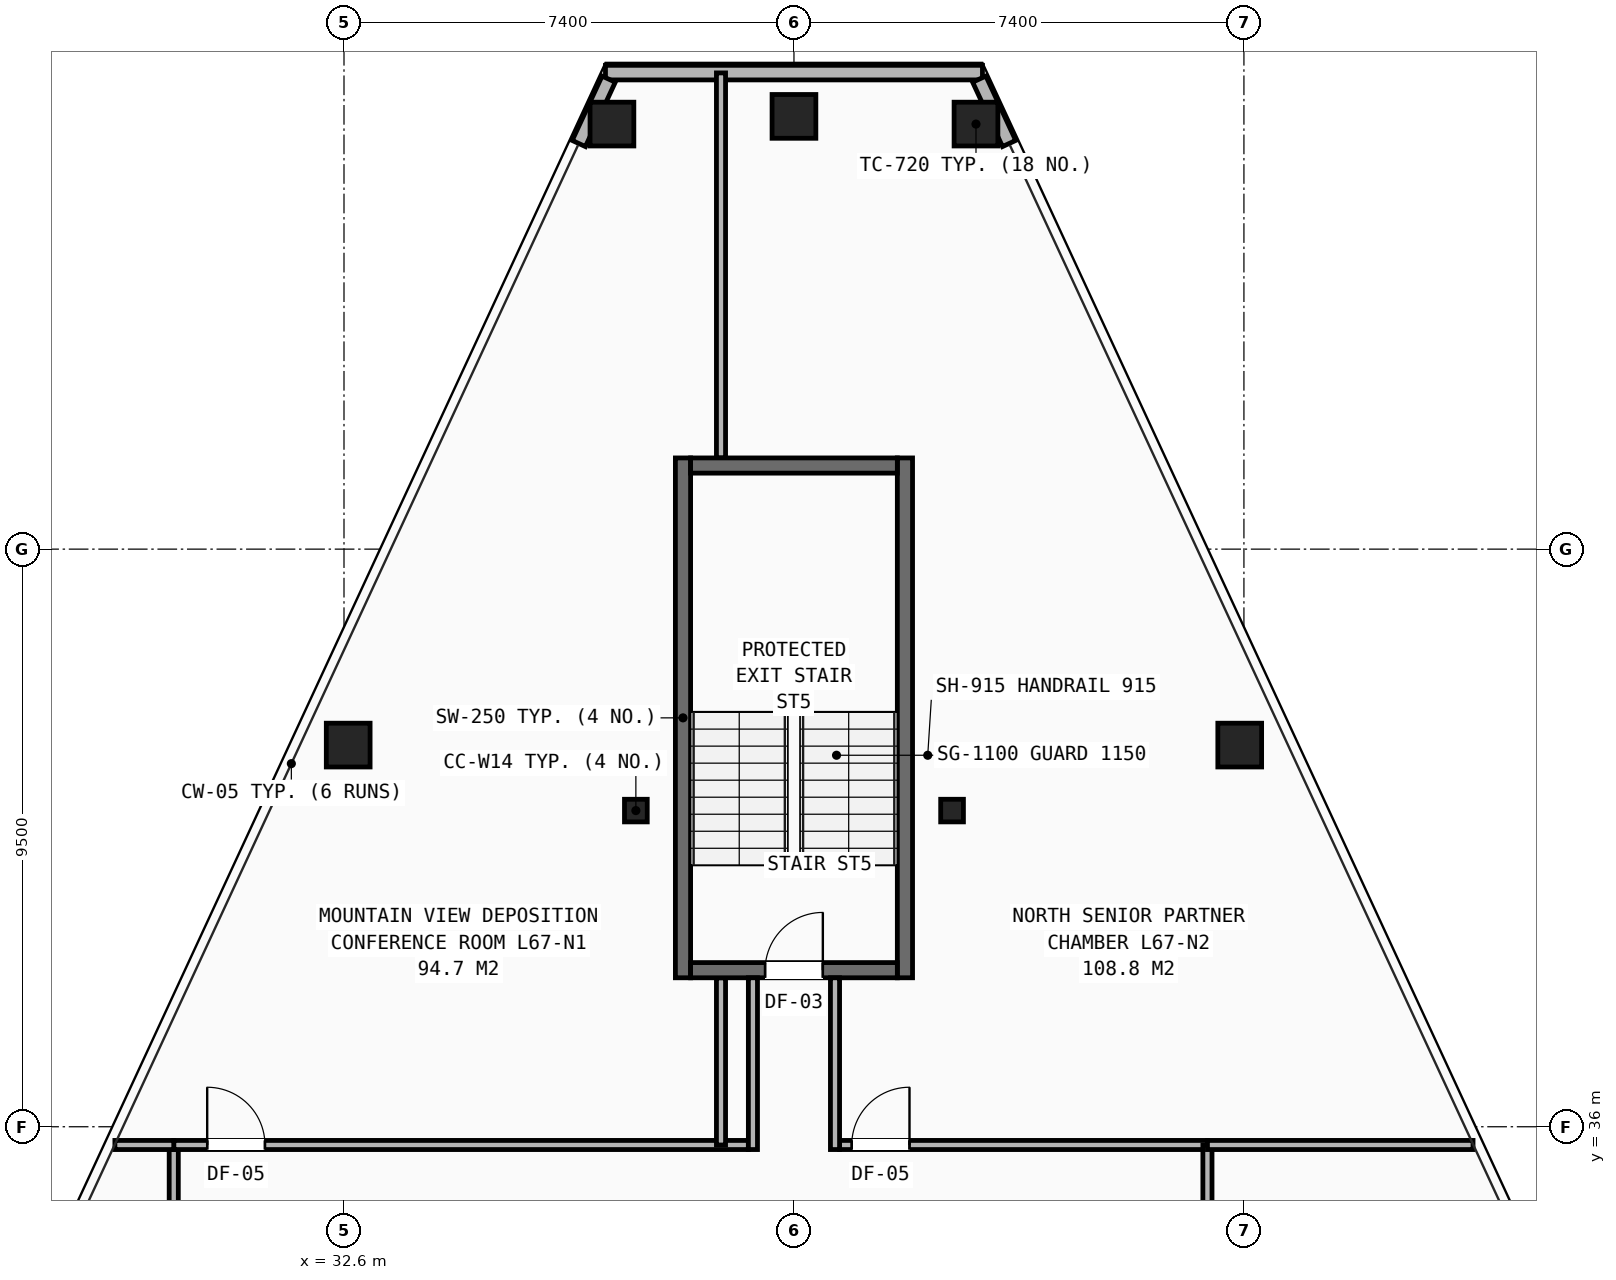
"""IFC4 building model, lengths in metres.
Left out: names, types, materials, properties, quantities, classifications, styles, units other than length and angle.
Written with IfcOpenShell. Run it as: python <this file> out.ifc"""

import sys

from ifc_helpers import new_model, si_unit, direction, frame, frame_2d, origin, origin_2d, place, context, subcontext, project, spatial, rectangle, hollow_rectangle, i_section, extrude, element, fill, save


model = new_model("IFC4")
c1 = context("Model", 3, precision=1e-05, world=origin(), true_north=direction((0.0, 1.0)))
c2 = subcontext(c1, "Body", "Model", "MODEL_VIEW")
j1 = project(units=[si_unit("LENGTHUNIT", "METRE"), si_unit("PLANEANGLEUNIT", "RADIAN")], contexts=[c1])
p1 = place(None, origin())
s1 = spatial("IfcSite", under=j1, at=p1, CompositionType="ELEMENT")
p2 = place(p1, origin())
s2 = spatial("IfcBuilding", under=s1, at=p2, CompositionType="ELEMENT")
p3 = place(p2, frame((0.0, 0.0, 236.4)))
s3 = spatial("IfcBuildingStorey", under=s2, at=p3, CompositionType="ELEMENT", Elevation=236.4)
for number, where, z_axis, x_axis in (
    (1, (37.4, 41.2, 0.0), (0.0, 0.0, 1.0), (1.0, 0.0, 0.0)),
    (2, (42.6, 41.2, 0.0), (0.0, 0.0, 1.0), (1.0, 0.0, 0.0)),
):
    element("IfcColumn", number, at=place(p3, frame(where, z_axis=z_axis, x_axis=x_axis)), inside=s3, PredefinedType="COLUMN", context=c2, shape_type="SweptSolid", body=[
        extrude(i_section(OverallWidth=0.374, OverallDepth=0.372, WebThickness=0.016, FlangeThickness=0.026, at=origin_2d()), origin(), (0.0, 0.0, 1.0), 3.5),
    ])
for number, where, z_axis, x_axis in (
    (3, (42.993, 52.491, 0.0), (0.0, 0.0, 1.0), (1.0, 0.0, 0.0)),
    (4, (40.0, 52.617, 0.0), (0.0, 0.0, 1.0), (1.0, 0.0, 0.0)),
    (5, (37.007, 52.491, 0.0), (0.0, 0.0, 1.0), (1.0, 0.0, 0.0)),
    (6, (32.669, 42.277, 0.0), (0.0, 0.0, 1.0), (1.0, 0.0, 0.0)),
    (7, (47.331, 42.277, 0.0), (0.0, 0.0, 1.0), (1.0, 0.0, 0.0)),
):
    element("IfcColumn", number, at=place(p3, frame(where, z_axis=z_axis, x_axis=x_axis)), inside=s3, PredefinedType="COLUMN", context=c2, shape_type="SweptSolid", body=[
        extrude(hollow_rectangle(XDim=0.72, YDim=0.72, WallThickness=0.05, at=origin_2d()), origin(), (0.0, 0.0, 1.0), 3.5),
    ])
p4 = place(p3, frame((36.9, 53.337, 0.0), z_axis=(0.0, 0.0, 1.0), x_axis=(1.0, 0.0, 0.0)))
e8 = element("IfcWall", 8, at=p4, inside=s3, PredefinedType="SHEAR", context=c2, shape_type="SweptSolid", body=[
    extrude(rectangle(XDim=6.2, YDim=0.24, at=frame_2d((3.1, 0.0))), origin(), (0.0, 0.0, 1.0), 2.623),
])
for number, where, z_axis, x_axis in (
    (9, (36.953, 53.23, 0.0), (0.0, 0.0, 1.0), (-0.421, -0.907, 0.0)),
    (10, (43.538, 52.171, 0.0), (0.0, 0.0, 1.0), (-0.421, 0.907, 0.0)),
):
    element("IfcWall", number, at=place(p3, frame(where, z_axis=z_axis, x_axis=x_axis)), inside=s3, PredefinedType="SHEAR", context=c2, shape_type="SweptSolid", body=[
        extrude(rectangle(XDim=1.167, YDim=0.24, at=frame_2d((0.584, 0.0))), origin(), (0.0, 0.0, 1.0), 2.623),
    ])
p5 = place(p3, frame((29.8, 16.4, 0.0), z_axis=(0.0, 0.0, 1.0), x_axis=(0.0, 1.0, 0.0)))
e11 = element("IfcWall", 11, at=p5, inside=s3, PredefinedType="PARTITIONING", context=c2, shape_type="SweptSolid", body=[
    extrude(rectangle(XDim=19.3, YDim=0.15, at=frame_2d((9.65, 0.0))), origin(), (0.0, 0.0, 1.0), 2.292),
])
p6 = place(p5, frame((0.35, 0.0, 0.0)))
e12 = element("IfcOpeningElement", 12, at=p6, cuts=e11, PredefinedType="OPENING", context=c2, shape_type="SweptSolid", body=[
    extrude(rectangle(XDim=0.95, YDim=2.1, at=frame_2d((0.475, 1.05))), frame((0.0, 0.085, 0.0), z_axis=(0.0, -1.0, 0.0), x_axis=(1.0, 0.0, 0.0)), (0.0, 0.0, 1.0), 0.17),
])
p7 = place(p5, frame((3.75, 0.0, 0.0)))
e13 = element("IfcOpeningElement", 13, at=p7, cuts=e11, PredefinedType="OPENING", context=c2, shape_type="SweptSolid", body=[
    extrude(rectangle(XDim=0.95, YDim=2.1, at=frame_2d((0.475, 1.05))), frame((0.0, 0.085, 0.0), z_axis=(0.0, -1.0, 0.0), x_axis=(1.0, 0.0, 0.0)), (0.0, 0.0, 1.0), 0.17),
])
p8 = place(p5, frame((8.15, 0.0, 0.0)))
e14 = element("IfcOpeningElement", 14, at=p8, cuts=e11, PredefinedType="OPENING", context=c2, shape_type="SweptSolid", body=[
    extrude(rectangle(XDim=0.95, YDim=2.1, at=frame_2d((0.475, 1.05))), frame((0.0, 0.085, 0.0), z_axis=(0.0, -1.0, 0.0), x_axis=(1.0, 0.0, 0.0)), (0.0, 0.0, 1.0), 0.17),
])
p9 = place(p5, frame((12.55, 0.0, 0.0)))
e15 = element("IfcOpeningElement", 15, at=p9, cuts=e11, PredefinedType="OPENING", context=c2, shape_type="SweptSolid", body=[
    extrude(rectangle(XDim=0.95, YDim=2.1, at=frame_2d((0.475, 1.05))), frame((0.0, 0.085, 0.0), z_axis=(0.0, -1.0, 0.0), x_axis=(1.0, 0.0, 0.0)), (0.0, 0.0, 1.0), 0.17),
])
p10 = place(p3, frame((29.8, 35.7, 0.0), z_axis=(0.0, 0.0, 1.0), x_axis=(1.0, 0.0, 0.0)))
e16 = element("IfcWall", 16, at=p10, inside=s3, PredefinedType="PARTITIONING", context=c2, shape_type="SweptSolid", body=[
    extrude(rectangle(XDim=9.45, YDim=0.15, at=frame_2d((4.725, 0.0))), origin(), (0.0, 0.0, 1.0), 2.628),
])
p11 = place(p10, frame((0.55, 0.0, 0.0)))
e17 = element("IfcOpeningElement", 17, at=p11, cuts=e16, PredefinedType="OPENING", context=c2, shape_type="SweptSolid", body=[
    extrude(rectangle(XDim=0.95, YDim=2.1, at=frame_2d((0.475, 1.05))), frame((0.0, 0.085, 0.0), z_axis=(0.0, -1.0, 0.0), x_axis=(1.0, 0.0, 0.0)), (0.0, 0.0, 1.0), 0.17),
])
p12 = place(p3, frame((40.75, 35.7, 0.0), z_axis=(0.0, 0.0, 1.0), x_axis=(1.0, 0.0, 0.0)))
e18 = element("IfcWall", 18, at=p12, inside=s3, PredefinedType="PARTITIONING", context=c2, shape_type="SweptSolid", body=[
    extrude(rectangle(XDim=6.05, YDim=0.15, at=frame_2d((3.025, 0.0))), origin(), (0.0, 0.0, 1.0), 3.25),
])
p13 = place(p12, frame((0.2, 0.0, 0.0)))
e19 = element("IfcOpeningElement", 19, at=p13, cuts=e18, PredefinedType="OPENING", context=c2, shape_type="SweptSolid", body=[
    extrude(rectangle(XDim=0.95, YDim=2.1, at=frame_2d((0.475, 1.05))), frame((0.0, 0.085, 0.0), z_axis=(0.0, -1.0, 0.0), x_axis=(1.0, 0.0, 0.0)), (0.0, 0.0, 1.0), 0.17),
])
p14 = place(p3, frame((46.8, 31.2, 0.0), z_axis=(0.0, 0.0, 1.0), x_axis=(0.0, 1.0, 0.0)))
e20 = element("IfcWall", 20, at=p14, inside=s3, PredefinedType="PARTITIONING", context=c2, shape_type="SweptSolid", body=[
    extrude(rectangle(XDim=4.5, YDim=0.15, at=frame_2d((2.25, 0.0))), origin(), (0.0, 0.0, 1.0), 2.705),
])
p15 = place(p3, frame((28.832, 35.7, 0.0), z_axis=(0.0, 0.0, 1.0), x_axis=(1.0, 0.0, 0.0)))
e21 = element("IfcWall", 21, at=p15, inside=s3, PredefinedType="PARTITIONING", context=c2, shape_type="SweptSolid", body=[
    extrude(rectangle(XDim=0.968, YDim=0.15, at=frame_2d((0.484, 0.0))), origin(), (0.0, 0.0, 1.0), 2.628),
])
p16 = place(p3, frame((46.8, 35.7, 0.0), z_axis=(0.0, 0.0, 1.0), x_axis=(1.0, 0.0, 0.0)))
e22 = element("IfcWall", 22, at=p16, inside=s3, PredefinedType="PARTITIONING", context=c2, shape_type="SweptSolid", body=[
    extrude(rectangle(XDim=4.368, YDim=0.15, at=frame_2d((2.184, 0.0))), origin(), (0.0, 0.0, 1.0), 2.628),
])
p17 = place(p3, frame((38.8, 35.7, 0.0), z_axis=(0.0, 0.0, 1.0), x_axis=(0.0, 1.0, 0.0)))
e23 = element("IfcWall", 23, at=p17, inside=s3, PredefinedType="PARTITIONING", context=c2, shape_type="SweptSolid", body=[
    extrude(rectangle(XDim=2.75, YDim=0.15, at=frame_2d((1.375, 0.0))), origin(), (0.0, 0.0, 1.0), 3.25),
])
p18 = place(p3, frame((38.8, 47.0, 0.0), z_axis=(0.0, 0.0, 1.0), x_axis=(0.0, 1.0, 0.0)))
e24 = element("IfcWall", 24, at=p18, inside=s3, PredefinedType="PARTITIONING", context=c2, shape_type="SweptSolid", body=[
    extrude(rectangle(XDim=6.332, YDim=0.15, at=frame_2d((3.166, 0.0))), origin(), (0.0, 0.0, 1.0), 2.628),
])
for number, where, z_axis, x_axis in (
    (25, (38.175, 38.45, 0.0), (0.0, 0.0, 1.0), (0.0, 1.0, 0.0)),
    (26, (41.825, 38.45, 0.0), (0.0, 0.0, 1.0), (0.0, 1.0, 0.0)),
):
    element("IfcWall", number, at=place(p3, frame(where, z_axis=z_axis, x_axis=x_axis)), inside=s3, PredefinedType="SHEAR", context=c2, shape_type="SweptSolid", body=[
        extrude(rectangle(XDim=8.55, YDim=0.25, at=frame_2d((4.275, 0.0))), origin(), (0.0, 0.0, 1.0), 3.25),
    ])
p19 = place(p3, frame((38.3, 38.575, 0.0), z_axis=(0.0, 0.0, 1.0), x_axis=(1.0, 0.0, 0.0)))
e27 = element("IfcWall", 27, at=p19, inside=s3, PredefinedType="SHEAR", context=c2, shape_type="SweptSolid", body=[
    extrude(rectangle(XDim=3.4, YDim=0.25, at=frame_2d((1.7, 0.0))), origin(), (0.0, 0.0, 1.0), 3.25),
])
p20 = place(p19, frame((1.225, 0.0, 0.0)))
e28 = element("IfcOpeningElement", 28, at=p20, cuts=e27, PredefinedType="OPENING", context=c2, shape_type="SweptSolid", body=[
    extrude(rectangle(XDim=0.95, YDim=2.1, at=frame_2d((0.475, 1.05))), frame((0.0, 0.135, 0.0), z_axis=(0.0, -1.0, 0.0), x_axis=(1.0, 0.0, 0.0)), (0.0, 0.0, 1.0), 0.27),
])
p21 = place(p3, frame((38.3, 46.875, 0.0), z_axis=(0.0, 0.0, 1.0), x_axis=(1.0, 0.0, 0.0)))
e29 = element("IfcWall", 29, at=p21, inside=s3, PredefinedType="SHEAR", context=c2, shape_type="SweptSolid", body=[
    extrude(rectangle(XDim=3.4, YDim=0.25, at=frame_2d((1.7, 0.0))), origin(), (0.0, 0.0, 1.0), 3.25),
])
for number, where, z_axis, x_axis in (
    (30, (39.325, 35.625, 0.0), (0.0, 0.0, 1.0), (0.0, 1.0, 0.0)),
    (31, (40.675, 35.625, 0.0), (0.0, 0.0, 1.0), (0.0, 1.0, 0.0)),
):
    element("IfcWall", number, at=place(p3, frame(where, z_axis=z_axis, x_axis=x_axis)), inside=s3, PredefinedType="PARTITIONING", context=c2, shape_type="SweptSolid", body=[
        extrude(rectangle(XDim=2.825, YDim=0.15, at=frame_2d((1.413, 0.0))), origin(), (0.0, 0.0, 1.0), 3.25),
    ])
p22 = place(p11, origin())
e32 = element("IfcDoor", 32, at=p22, inside=s3, OperationType="SINGLE_SWING_LEFT", PredefinedType="DOOR", context=c2, shape_type="SweptSolid", body=[
    extrude(rectangle(XDim=0.95, YDim=2.1, at=frame_2d((0.475, 1.05))), frame((0.0, 0.025, 0.0), z_axis=(0.0, -1.0, 0.0), x_axis=(1.0, 0.0, 0.0)), (0.0, 0.0, 1.0), 0.05),
])
fill(e17, e32)
p23 = place(p13, origin())
e33 = element("IfcDoor", 33, at=p23, inside=s3, OperationType="SINGLE_SWING_RIGHT", PredefinedType="DOOR", context=c2, shape_type="SweptSolid", body=[
    extrude(rectangle(XDim=0.95, YDim=2.1, at=frame_2d((0.475, 1.05))), frame((0.0, 0.025, 0.0), z_axis=(0.0, -1.0, 0.0), x_axis=(1.0, 0.0, 0.0)), (0.0, 0.0, 1.0), 0.05),
])
fill(e19, e33)
p24 = place(p20, origin())
e34 = element("IfcDoor", 34, at=p24, inside=s3, OperationType="SINGLE_SWING_RIGHT", PredefinedType="DOOR", context=c2, shape_type="SweptSolid", body=[
    extrude(rectangle(XDim=0.95, YDim=2.1, at=frame_2d((0.475, 1.05))), frame((0.0, 0.025, 0.0), z_axis=(0.0, -1.0, 0.0), x_axis=(1.0, 0.0, 0.0)), (0.0, 0.0, 1.0), 0.05),
])
fill(e28, e34)
save(model, sys.argv[1])
